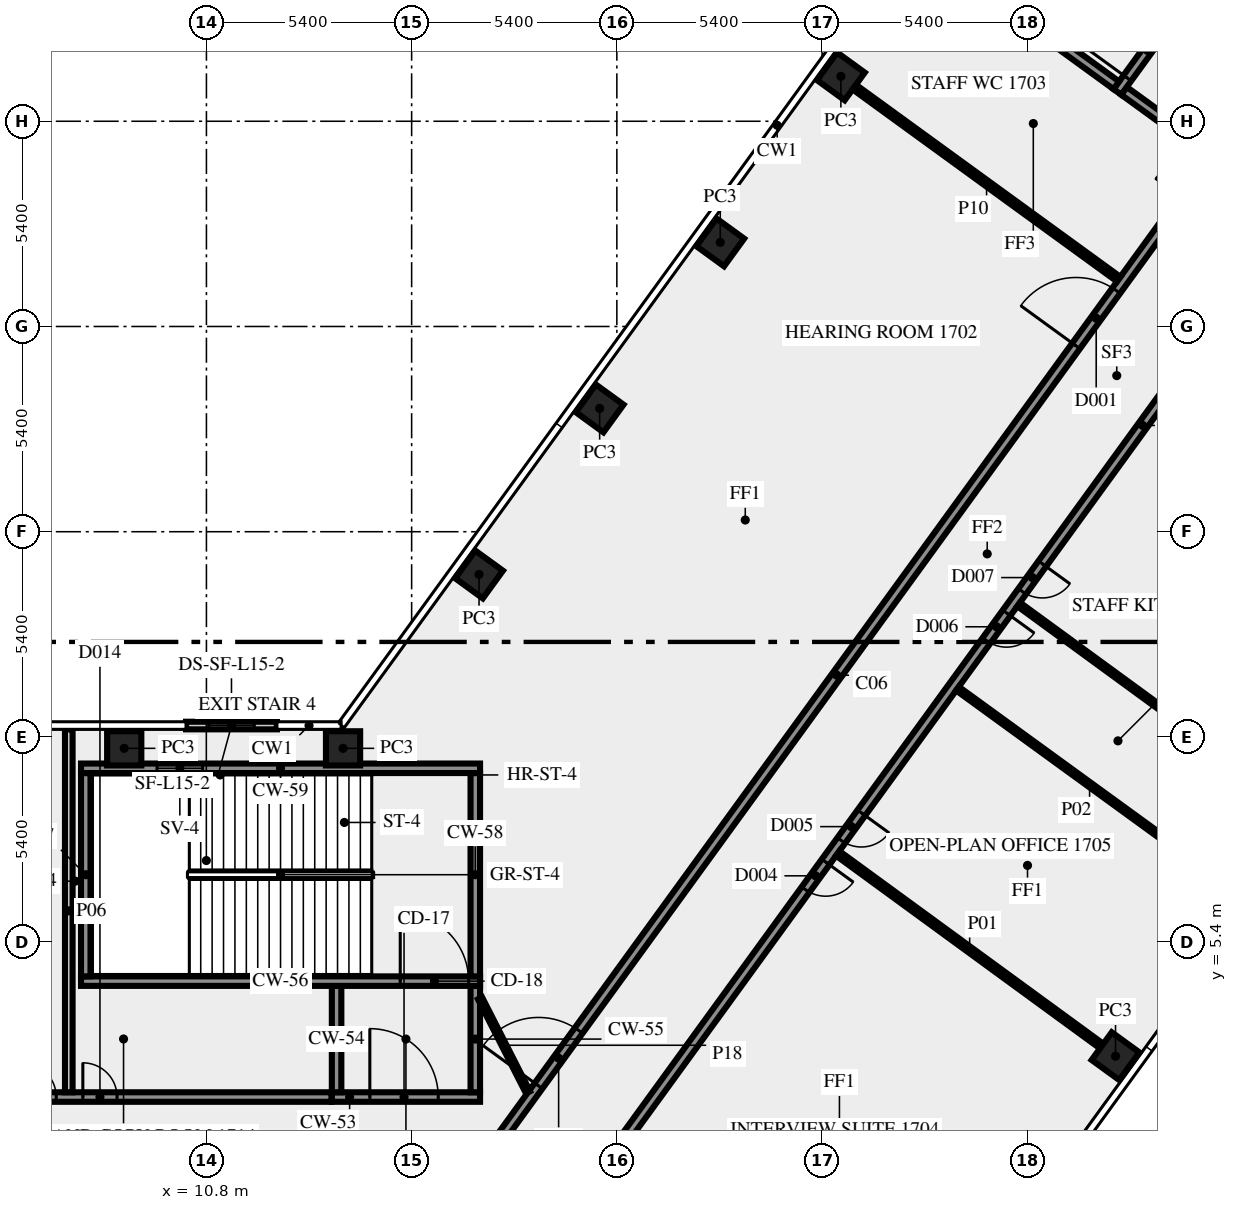
"""IFC4 building model, lengths in metres.
Left out: names, types, materials, properties, quantities, classifications, styles, units other than length and angle.
Written with IfcOpenShell. Run it as: python <this file> out.ifc"""

import sys

from ifc_helpers import new_model, si_unit, direction, frame, frame_2d, origin, origin_2d, place, context, subcontext, project, spatial, rectangle, extrude, element, fill, save


model = new_model("IFC4")
c1 = context("Model", 3, precision=1e-05, world=origin(), true_north=direction((0.0, 1.0)))
c2 = subcontext(c1, "Body", "Model", "MODEL_VIEW")
j1 = project(units=[si_unit("LENGTHUNIT", "METRE"), si_unit("PLANEANGLEUNIT", "RADIAN")], contexts=[c1])
p1 = place(None, origin())
s1 = spatial("IfcSite", under=j1, at=p1, CompositionType="ELEMENT")
p2 = place(p1, origin())
s2 = spatial("IfcBuilding", under=s1, at=p2, CompositionType="ELEMENT")
p3 = place(p2, frame((0.0, 0.0, 75.0)))
s3 = spatial("IfcBuildingStorey", under=s2, at=p3, CompositionType="ELEMENT", Elevation=75.0)
for number, where, z_axis, x_axis in (
    (1, (34.722, 2.4, 0.0), (0.0, 0.0, 1.0), (0.588, 0.809, 0.0)),
    (2, (27.495, 28.181, 0.0), (0.0, 0.0, 1.0), (-0.588, -0.809, 0.0)),
    (3, (24.321, 23.812, 0.0), (0.0, 0.0, 1.0), (-0.588, -0.809, 0.0)),
    (4, (21.147, 19.444, 0.0), (0.0, 0.0, 1.0), (-0.588, -0.809, 0.0)),
    (5, (17.974, 15.075, 0.0), (0.0, 0.0, 1.0), (-0.588, -0.809, 0.0)),
    (6, (14.395, 10.5, 0.0), (0.0, 0.0, 1.0), (-1.0, 0.0, 0.0)),
    (7, (8.637, 10.5, 0.0), (0.0, 0.0, 1.0), (-1.0, 0.0, 0.0)),
):
    element("IfcColumn", number, at=place(p3, frame(where, z_axis=z_axis, x_axis=x_axis)), inside=s3, PredefinedType="COLUMN", context=c2, shape_type="SweptSolid", body=[
        extrude(rectangle(XDim=0.9, YDim=0.9, at=origin_2d()), origin(), (0.0, 0.0, 1.0), 3.4),
    ])
p4 = place(p3, frame((12.655, 11.1, 0.0), z_axis=(0.0, 0.0, 1.0), x_axis=(-1.0, 0.0, 0.0)))
e8 = element("IfcWall", 8, at=p4, inside=s3, PredefinedType="SOLIDWALL", context=c2, shape_type="SweptSolid", body=[
    extrude(rectangle(XDim=2.392, YDim=0.2, at=frame_2d((1.196, 0.0))), origin(), (0.0, 0.0, 1.0), 3.4),
])
p5 = place(p4, frame((0.596, 0.0, 1.0)))
e9 = element("IfcOpeningElement", 9, at=p5, cuts=e8, PredefinedType="OPENING", context=c2, shape_type="SweptSolid", body=[
    extrude(rectangle(XDim=1.2, YDim=1.2, at=frame_2d((0.6, 0.6))), frame((0.0, 0.11, 0.0), z_axis=(0.0, -1.0, 0.0), x_axis=(1.0, 0.0, 0.0)), (0.0, 0.0, 1.0), 0.22),
])
p6 = place(p3, frame((14.1, 1.325, 0.0), z_axis=(0.0, 0.0, 1.0), x_axis=(1.0, 0.0, 0.0)))
e10 = element("IfcWall", 10, at=p6, inside=s3, PredefinedType="SHEAR", context=c2, shape_type="SweptSolid", body=[
    extrude(rectangle(XDim=3.9, YDim=0.25, at=frame_2d((1.95, 0.0))), origin(), (0.0, 0.0, 1.0), 3.4),
])
p7 = place(p6, frame((1.0, 0.0, 0.0)))
e11 = element("IfcOpeningElement", 11, at=p7, cuts=e10, PredefinedType="OPENING", context=c2, shape_type="SweptSolid", body=[
    extrude(rectangle(XDim=1.8, YDim=2.1, at=frame_2d((0.9, 1.05))), frame((0.0, 0.135, 0.0), z_axis=(0.0, -1.0, 0.0), x_axis=(1.0, 0.0, 0.0)), (0.0, 0.0, 1.0), 0.27),
])
for number, where, z_axis, x_axis in (
    (12, (14.225, 1.45, 0.0), (0.0, 0.0, 1.0), (0.0, 1.0, 0.0)),
    (13, (17.875, 1.45, 0.0), (0.0, 0.0, 1.0), (0.0, 1.0, 0.0)),
):
    element("IfcWall", number, at=place(p3, frame(where, z_axis=z_axis, x_axis=x_axis)), inside=s3, PredefinedType="SHEAR", context=c2, shape_type="SweptSolid", body=[
        extrude(rectangle(XDim=2.8, YDim=0.25, at=frame_2d((1.4, 0.0))), origin(), (0.0, 0.0, 1.0), 3.4),
    ])
p8 = place(p3, frame((7.5, 4.375, 0.0), z_axis=(0.0, 0.0, 1.0), x_axis=(1.0, 0.0, 0.0)))
e14 = element("IfcWall", 14, at=p8, inside=s3, PredefinedType="SHEAR", context=c2, shape_type="SweptSolid", body=[
    extrude(rectangle(XDim=10.5, YDim=0.25, at=frame_2d((5.25, 0.0))), origin(), (0.0, 0.0, 1.0), 3.4),
])
p9 = place(p8, frame((8.4, 0.0, 0.0)))
e15 = element("IfcOpeningElement", 15, at=p9, cuts=e14, PredefinedType="OPENING", context=c2, shape_type="SweptSolid", body=[
    extrude(rectangle(XDim=1.8, YDim=2.1, at=frame_2d((0.9, 1.05))), frame((0.0, 0.135, 0.0), z_axis=(0.0, -1.0, 0.0), x_axis=(1.0, 0.0, 0.0)), (0.0, 0.0, 1.0), 0.27),
])
for number, where, z_axis, x_axis in (
    (16, (7.625, 4.5, 0.0), (0.0, 0.0, 1.0), (0.0, 1.0, 0.0)),
    (17, (17.875, 4.5, 0.0), (0.0, 0.0, 1.0), (0.0, 1.0, 0.0)),
):
    element("IfcWall", number, at=place(p3, frame(where, z_axis=z_axis, x_axis=x_axis)), inside=s3, PredefinedType="SHEAR", context=c2, shape_type="SweptSolid", body=[
        extrude(rectangle(XDim=5.35, YDim=0.25, at=frame_2d((2.675, 0.0))), origin(), (0.0, 0.0, 1.0), 3.4),
    ])
p10 = place(p3, frame((7.5, 9.975, 0.0), z_axis=(0.0, 0.0, 1.0), x_axis=(1.0, 0.0, 0.0)))
e18 = element("IfcWall", 18, at=p10, inside=s3, PredefinedType="SHEAR", context=c2, shape_type="SweptSolid", body=[
    extrude(rectangle(XDim=10.5, YDim=0.25, at=frame_2d((5.25, 0.0))), origin(), (0.0, 0.0, 1.0), 3.4),
])
p11 = place(p10, frame((2.0, 0.0, 1.0)))
e19 = element("IfcOpeningElement", 19, at=p11, cuts=e18, PredefinedType="OPENING", context=c2, shape_type="SweptSolid", body=[
    extrude(rectangle(XDim=1.2, YDim=1.2, at=frame_2d((0.6, 0.6))), frame((0.0, 0.135, 0.0), z_axis=(0.0, -1.0, 0.0), x_axis=(1.0, 0.0, 0.0)), (0.0, 0.0, 1.0), 0.27),
])
p12 = place(p3, frame((37.21, 26.154, 0.0), z_axis=(0.0, 0.0, 1.0), x_axis=(-0.809041377956, 0.587751689708, 0.0)))
e20 = element("IfcWall", 20, at=p12, inside=s3, PredefinedType="SHEAR", context=c2, shape_type="SweptSolid", body=[
    extrude(rectangle(XDim=2.8, YDim=0.25, at=frame_2d((1.4, 0.0))), origin(), (0.0, 0.0, 1.0), 3.4),
])
p13 = place(p3, frame((34.77, 27.772, 0.0), z_axis=(0.0, 0.0, 1.0), x_axis=(0.587795589702, 0.809009483706, 0.0)))
e21 = element("IfcWall", 21, at=p13, inside=s3, PredefinedType="SHEAR", context=c2, shape_type="SweptSolid", body=[
    extrude(rectangle(XDim=10.5, YDim=0.25, at=frame_2d((5.25, 0.0))), origin(), (0.0, 0.0, 1.0), 3.4),
])
p14 = place(p13, frame((0.45, 0.0, 0.0)))
e22 = element("IfcOpeningElement", 22, at=p14, cuts=e21, PredefinedType="OPENING", context=c2, shape_type="SweptSolid", body=[
    extrude(rectangle(XDim=1.8, YDim=2.1, at=frame_2d((0.9, 1.05))), frame((0.0, 0.135, 0.0), z_axis=(0.0, -1.0, 0.0), x_axis=(1.0, 0.0, 0.0)), (0.0, 0.0, 1.0), 0.27),
])
p15 = place(p3, frame((34.742, 27.947, 0.0), z_axis=(0.0, 0.0, 1.0), x_axis=(-0.8089984606, 0.587810760999, 0.0)))
e23 = element("IfcWall", 23, at=p15, inside=s3, PredefinedType="SHEAR", context=c2, shape_type="SweptSolid", body=[
    extrude(rectangle(XDim=5.35, YDim=0.25, at=frame_2d((2.675, 0.0))), origin(), (0.0, 0.0, 1.0), 3.4),
])
p16 = place(p3, frame((-14.09, 1.325, 0.0), z_axis=(0.0, 0.0, 1.0), x_axis=(1.0, 0.0, 0.0)))
e24 = element("IfcWall", 24, at=p16, inside=s3, PredefinedType="SOLIDWALL", context=c2, shape_type="SweptSolid", body=[
    extrude(rectangle(XDim=28.18, YDim=0.25, at=frame_2d((14.09, 0.0))), origin(), (0.0, 0.0, 1.0), 3.4),
])
p17 = place(p16, frame((20.038, 0.0, 0.0)))
e25 = element("IfcOpeningElement", 25, at=p17, cuts=e24, PredefinedType="OPENING", context=c2, shape_type="SweptSolid", body=[
    extrude(rectangle(XDim=0.9, YDim=2.1, at=frame_2d((0.45, 1.05))), frame((0.0, 0.135, 0.0), z_axis=(0.0, -1.0, 0.0), x_axis=(1.0, 0.0, 0.0)), (0.0, 0.0, 1.0), 0.27),
])
p18 = place(p16, frame((7.242, 0.0, 0.0)))
e26 = element("IfcOpeningElement", 26, at=p18, cuts=e24, PredefinedType="OPENING", context=c2, shape_type="SweptSolid", body=[
    extrude(rectangle(XDim=0.9, YDim=2.1, at=frame_2d((0.45, 1.05))), frame((0.0, 0.135, 0.0), z_axis=(0.0, -1.0, 0.0), x_axis=(1.0, 0.0, 0.0)), (0.0, 0.0, 1.0), 0.27),
])
p19 = place(p16, frame((21.638, 0.0, 0.0)))
e27 = element("IfcOpeningElement", 27, at=p19, cuts=e24, PredefinedType="OPENING", context=c2, shape_type="SweptSolid", body=[
    extrude(rectangle(XDim=0.9, YDim=2.1, at=frame_2d((0.45, 1.05))), frame((0.0, 0.135, 0.0), z_axis=(0.0, -1.0, 0.0), x_axis=(1.0, 0.0, 0.0)), (0.0, 0.0, 1.0), 0.27),
])
p20 = place(p16, frame((5.642, 0.0, 0.0)))
e28 = element("IfcOpeningElement", 28, at=p20, cuts=e24, PredefinedType="OPENING", context=c2, shape_type="SweptSolid", body=[
    extrude(rectangle(XDim=0.9, YDim=2.1, at=frame_2d((0.45, 1.05))), frame((0.0, 0.135, 0.0), z_axis=(0.0, -1.0, 0.0), x_axis=(1.0, 0.0, 0.0)), (0.0, 0.0, 1.0), 0.27),
])
p21 = place(p3, frame((17.545, -1.125, 0.0), z_axis=(0.0, 0.0, 1.0), x_axis=(0.587786323093, 0.809016216391, 0.0)))
e29 = element("IfcWall", 29, at=p21, inside=s3, PredefinedType="SOLIDWALL", context=c2, shape_type="SweptSolid", body=[
    extrude(rectangle(XDim=33.493, YDim=0.25, at=frame_2d((16.747, 0.0))), origin(), (0.0, 0.0, 1.0), 3.4),
])
p22 = place(p21, frame((27.458, 0.0, 0.0)))
e30 = element("IfcOpeningElement", 30, at=p22, cuts=e29, PredefinedType="OPENING", context=c2, shape_type="SweptSolid", body=[
    extrude(rectangle(XDim=1.8, YDim=2.1, at=frame_2d((0.9, 1.05))), frame((0.0, 0.135, 0.0), z_axis=(0.0, -1.0, 0.0), x_axis=(1.0, 0.0, 0.0)), (0.0, 0.0, 1.0), 0.27),
])
p23 = place(p21, frame((3.392, 0.0, 0.0)))
e31 = element("IfcOpeningElement", 31, at=p23, cuts=e29, PredefinedType="OPENING", context=c2, shape_type="SweptSolid", body=[
    extrude(rectangle(XDim=1.8, YDim=2.1, at=frame_2d((0.9, 1.05))), frame((0.0, 0.135, 0.0), z_axis=(0.0, -1.0, 0.0), x_axis=(1.0, 0.0, 0.0)), (0.0, 0.0, 1.0), 0.27),
])
p24 = place(p21, frame((32.253, 0.0, 0.0)))
e32 = element("IfcOpeningElement", 32, at=p24, cuts=e29, PredefinedType="OPENING", context=c2, shape_type="SweptSolid", body=[
    extrude(rectangle(XDim=0.9, YDim=2.1, at=frame_2d((0.45, 1.05))), frame((0.0, 0.135, 0.0), z_axis=(0.0, -1.0, 0.0), x_axis=(1.0, 0.0, 0.0)), (0.0, 0.0, 1.0), 0.27),
])
p25 = place(p3, frame((43.467, 30.045, 0.0), z_axis=(0.0, 0.0, 1.0), x_axis=(-0.587784726077, -0.809017376692, 0.0)))
e33 = element("IfcWall", 33, at=p25, inside=s3, PredefinedType="SOLIDWALL", context=c2, shape_type="SweptSolid", body=[
    extrude(rectangle(XDim=39.02, YDim=0.25, at=frame_2d((19.51, 0.0))), origin(), (0.0, 0.0, 1.0), 3.4),
])
p26 = place(p25, frame((26.254, 0.0, 0.0)))
e34 = element("IfcOpeningElement", 34, at=p26, cuts=e33, PredefinedType="OPENING", context=c2, shape_type="SweptSolid", body=[
    extrude(rectangle(XDim=0.9, YDim=2.1, at=frame_2d((0.45, 1.05))), frame((0.0, 0.135, 0.0), z_axis=(0.0, -1.0, 0.0), x_axis=(1.0, 0.0, 0.0)), (0.0, 0.0, 1.0), 0.27),
])
p27 = place(p25, frame((2.205, 0.0, 0.0)))
e35 = element("IfcOpeningElement", 35, at=p27, cuts=e33, PredefinedType="OPENING", context=c2, shape_type="SweptSolid", body=[
    extrude(rectangle(XDim=0.9, YDim=2.1, at=frame_2d((0.45, 1.05))), frame((0.0, 0.135, 0.0), z_axis=(0.0, -1.0, 0.0), x_axis=(1.0, 0.0, 0.0)), (0.0, 0.0, 1.0), 0.27),
])
p28 = place(p25, frame((27.855, 0.0, 0.0)))
e36 = element("IfcOpeningElement", 36, at=p28, cuts=e33, PredefinedType="OPENING", context=c2, shape_type="SweptSolid", body=[
    extrude(rectangle(XDim=0.9, YDim=2.1, at=frame_2d((0.45, 1.05))), frame((0.0, 0.135, 0.0), z_axis=(0.0, -1.0, 0.0), x_axis=(1.0, 0.0, 0.0)), (0.0, 0.0, 1.0), 0.27),
])
p29 = place(p25, frame((18.155, 0.0, 0.0)))
e37 = element("IfcOpeningElement", 37, at=p29, cuts=e33, PredefinedType="OPENING", context=c2, shape_type="SweptSolid", body=[
    extrude(rectangle(XDim=0.9, YDim=2.1, at=frame_2d((0.45, 1.05))), frame((0.0, 0.135, 0.0), z_axis=(0.0, -1.0, 0.0), x_axis=(1.0, 0.0, 0.0)), (0.0, 0.0, 1.0), 0.27),
])
p30 = place(p25, frame((19.755, 0.0, 0.0)))
e38 = element("IfcOpeningElement", 38, at=p30, cuts=e33, PredefinedType="OPENING", context=c2, shape_type="SweptSolid", body=[
    extrude(rectangle(XDim=0.9, YDim=2.1, at=frame_2d((0.45, 1.05))), frame((0.0, 0.135, 0.0), z_axis=(0.0, -1.0, 0.0), x_axis=(1.0, 0.0, 0.0)), (0.0, 0.0, 1.0), 0.27),
])
p31 = place(p25, frame((0.224, 0.0, 0.0)))
e39 = element("IfcOpeningElement", 39, at=p31, cuts=e33, PredefinedType="OPENING", context=c2, shape_type="SweptSolid", body=[
    extrude(rectangle(XDim=0.9, YDim=2.1, at=frame_2d((0.45, 1.05))), frame((0.0, 0.135, 0.0), z_axis=(0.0, -1.0, 0.0), x_axis=(1.0, 0.0, 0.0)), (0.0, 0.0, 1.0), 0.27),
])
p32 = place(p3, frame((27.413, 7.735, 0.0), z_axis=(0.0, 0.0, 1.0), x_axis=(0.807664804385, -0.589641894507, 0.0)))
e40 = element("IfcWall", 40, at=p32, inside=s3, PredefinedType="PARTITIONING", context=c2, shape_type="SweptSolid", body=[
    extrude(rectangle(XDim=8.594, YDim=0.15, at=frame_2d((4.297, 0.0))), origin(), (0.0, 0.0, 1.0), 3.4),
])
p33 = place(p3, frame((37.516, 7.02, 0.0), z_axis=(0.0, 0.0, 1.0), x_axis=(-0.809002556908, 0.587805123248, 0.0)))
e41 = element("IfcWall", 41, at=p33, inside=s3, PredefinedType="PARTITIONING", context=c2, shape_type="SweptSolid", body=[
    extrude(rectangle(XDim=8.595, YDim=0.12, at=frame_2d((4.297, 0.0))), origin(), (0.0, 0.0, 1.0), 3.4),
])
p34 = place(p3, frame((7.178, 1.45, 0.0), z_axis=(0.0, 0.0, 1.0), x_axis=(0.0, 1.0, 0.0)))
e42 = element("IfcWall", 42, at=p34, inside=s3, PredefinedType="SOLIDWALL", context=c2, shape_type="SweptSolid", body=[
    extrude(rectangle(XDim=9.55, YDim=0.2, at=frame_2d((4.775, 0.0))), origin(), (0.0, 0.0, 1.0), 2.5),
])
p35 = place(p3, frame((34.806, 22.845, 0.0), z_axis=(0.0, 0.0, 1.0), x_axis=(-0.809030728677, 0.587766348183, 0.0)))
e43 = element("IfcWall", 43, at=p35, inside=s3, PredefinedType="PARTITIONING", context=c2, shape_type="SweptSolid", body=[
    extrude(rectangle(XDim=8.596, YDim=0.15, at=frame_2d((4.298, 0.0))), origin(), (0.0, 0.0, 1.0), 3.4),
])
p36 = place(p3, frame((32.174, 14.288, 0.0), z_axis=(0.0, 0.0, 1.0), x_axis=(0.807664588563, -0.589642190131, 0.0)))
e44 = element("IfcWall", 44, at=p36, inside=s3, PredefinedType="PARTITIONING", context=c2, shape_type="SweptSolid", body=[
    extrude(rectangle(XDim=9.55, YDim=0.12, at=frame_2d((4.775, 0.0))), origin(), (0.0, 0.0, 1.0), 2.5),
])
p37 = place(p3, frame((18.0, 3.925, 0.0), z_axis=(0.0, 0.0, 1.0), x_axis=(0.453950796792, -0.891026752736, 0.0)))
e45 = element("IfcWall", 45, at=p37, inside=s3, PredefinedType="PARTITIONING", context=c2, shape_type="SweptSolid", body=[
    extrude(rectangle(XDim=2.778, YDim=0.12, at=frame_2d((1.389, 0.0))), origin(), (0.0, 0.0, 1.0), 3.4),
])
p38 = place(p5, origin())
e46 = element("IfcWindow", 46, at=p38, inside=s3, PartitioningType="SINGLE_PANEL", PredefinedType="WINDOW", context=c2, shape_type="SweptSolid", body=[
    extrude(rectangle(XDim=1.2, YDim=1.2, at=frame_2d((0.6, 0.6))), frame((0.0, 0.03, 0.0), z_axis=(0.0, -1.0, 0.0), x_axis=(1.0, 0.0, 0.0)), (0.0, 0.0, 1.0), 0.06),
])
fill(e9, e46)
p39 = place(p7, origin())
e47 = element("IfcDoor", 47, at=p39, inside=s3, OperationType="DOUBLE_DOOR_SINGLE_SWING", PredefinedType="DOOR", context=c2, shape_type="SweptSolid", body=[
    extrude(rectangle(XDim=1.8, YDim=2.1, at=frame_2d((0.9, 1.05))), frame((0.0, 0.025, 0.0), z_axis=(0.0, -1.0, 0.0), x_axis=(1.0, 0.0, 0.0)), (0.0, 0.0, 1.0), 0.05),
])
fill(e11, e47)
p40 = place(p9, origin())
e48 = element("IfcDoor", 48, at=p40, inside=s3, OperationType="DOUBLE_DOOR_SINGLE_SWING", PredefinedType="DOOR", context=c2, shape_type="SweptSolid", body=[
    extrude(rectangle(XDim=1.8, YDim=2.1, at=frame_2d((0.9, 1.05))), frame((0.0, 0.025, 0.0), z_axis=(0.0, -1.0, 0.0), x_axis=(1.0, 0.0, 0.0)), (0.0, 0.0, 1.0), 0.05),
])
fill(e15, e48)
p41 = place(p11, origin())
e49 = element("IfcWindow", 49, at=p41, inside=s3, PartitioningType="SINGLE_PANEL", PredefinedType="WINDOW", context=c2, shape_type="SweptSolid", body=[
    extrude(rectangle(XDim=1.2, YDim=1.2, at=frame_2d((0.6, 0.6))), frame((0.0, 0.03, 0.0), z_axis=(0.0, -1.0, 0.0), x_axis=(1.0, 0.0, 0.0)), (0.0, 0.0, 1.0), 0.06),
])
fill(e19, e49)
p42 = place(p14, origin())
e50 = element("IfcDoor", 50, at=p42, inside=s3, OperationType="DOUBLE_DOOR_SINGLE_SWING", PredefinedType="DOOR", context=c2, shape_type="SweptSolid", body=[
    extrude(rectangle(XDim=1.8, YDim=2.1, at=frame_2d((0.9, 1.05))), frame((0.0, 0.025, 0.0), z_axis=(0.0, -1.0, 0.0), x_axis=(1.0, 0.0, 0.0)), (0.0, 0.0, 1.0), 0.05),
])
fill(e22, e50)
p43 = place(p26, origin())
e51 = element("IfcDoor", 51, at=p43, inside=s3, OperationType="SINGLE_SWING_RIGHT", PredefinedType="DOOR", context=c2, shape_type="SweptSolid", body=[
    extrude(rectangle(XDim=0.9, YDim=2.1, at=frame_2d((0.45, 1.05))), frame((0.0, 0.025, 0.0), z_axis=(0.0, -1.0, 0.0), x_axis=(1.0, 0.0, 0.0)), (0.0, 0.0, 1.0), 0.05),
])
fill(e34, e51)
p44 = place(p17, origin())
e52 = element("IfcDoor", 52, at=p44, inside=s3, OperationType="SINGLE_SWING_RIGHT", PredefinedType="DOOR", context=c2, shape_type="SweptSolid", body=[
    extrude(rectangle(XDim=0.9, YDim=2.1, at=frame_2d((0.45, 1.05))), frame((0.0, 0.025, 0.0), z_axis=(0.0, -1.0, 0.0), x_axis=(1.0, 0.0, 0.0)), (0.0, 0.0, 1.0), 0.05),
])
fill(e25, e52)
p45 = place(p22, origin())
e53 = element("IfcDoor", 53, at=p45, inside=s3, OperationType="DOUBLE_DOOR_SINGLE_SWING", PredefinedType="DOOR", context=c2, shape_type="SweptSolid", body=[
    extrude(rectangle(XDim=1.8, YDim=2.1, at=frame_2d((0.9, 1.05))), frame((0.0, 0.025, 0.0), z_axis=(0.0, -1.0, 0.0), x_axis=(1.0, 0.0, 0.0)), (0.0, 0.0, 1.0), 0.05),
])
fill(e30, e53)
p46 = place(p23, origin())
e54 = element("IfcDoor", 54, at=p46, inside=s3, OperationType="DOUBLE_DOOR_SINGLE_SWING", PredefinedType="DOOR", context=c2, shape_type="SweptSolid", body=[
    extrude(rectangle(XDim=1.8, YDim=2.1, at=frame_2d((0.9, 1.05))), frame((0.0, 0.025, 0.0), z_axis=(0.0, -1.0, 0.0), x_axis=(1.0, 0.0, 0.0)), (0.0, 0.0, 1.0), 0.05),
])
fill(e31, e54)
p47 = place(p28, origin())
e55 = element("IfcDoor", 55, at=p47, inside=s3, OperationType="SINGLE_SWING_LEFT", PredefinedType="DOOR", context=c2, shape_type="SweptSolid", body=[
    extrude(rectangle(XDim=0.9, YDim=2.1, at=frame_2d((0.45, 1.05))), frame((0.0, 0.025, 0.0), z_axis=(0.0, -1.0, 0.0), x_axis=(1.0, 0.0, 0.0)), (0.0, 0.0, 1.0), 0.05),
])
fill(e36, e55)
p48 = place(p19, origin())
e56 = element("IfcDoor", 56, at=p48, inside=s3, OperationType="SINGLE_SWING_LEFT", PredefinedType="DOOR", context=c2, shape_type="SweptSolid", body=[
    extrude(rectangle(XDim=0.9, YDim=2.1, at=frame_2d((0.45, 1.05))), frame((0.0, 0.025, 0.0), z_axis=(0.0, -1.0, 0.0), x_axis=(1.0, 0.0, 0.0)), (0.0, 0.0, 1.0), 0.05),
])
fill(e27, e56)
p49 = place(p29, origin())
e57 = element("IfcDoor", 57, at=p49, inside=s3, OperationType="SINGLE_SWING_RIGHT", PredefinedType="DOOR", context=c2, shape_type="SweptSolid", body=[
    extrude(rectangle(XDim=0.9, YDim=2.1, at=frame_2d((0.45, 1.05))), frame((0.0, 0.025, 0.0), z_axis=(0.0, -1.0, 0.0), x_axis=(1.0, 0.0, 0.0)), (0.0, 0.0, 1.0), 0.05),
])
fill(e37, e57)
p50 = place(p30, origin())
e58 = element("IfcDoor", 58, at=p50, inside=s3, OperationType="SINGLE_SWING_LEFT", PredefinedType="DOOR", context=c2, shape_type="SweptSolid", body=[
    extrude(rectangle(XDim=0.9, YDim=2.1, at=frame_2d((0.45, 1.05))), frame((0.0, 0.025, 0.0), z_axis=(0.0, -1.0, 0.0), x_axis=(1.0, 0.0, 0.0)), (0.0, 0.0, 1.0), 0.05),
])
fill(e38, e58)
save(model, sys.argv[1])
